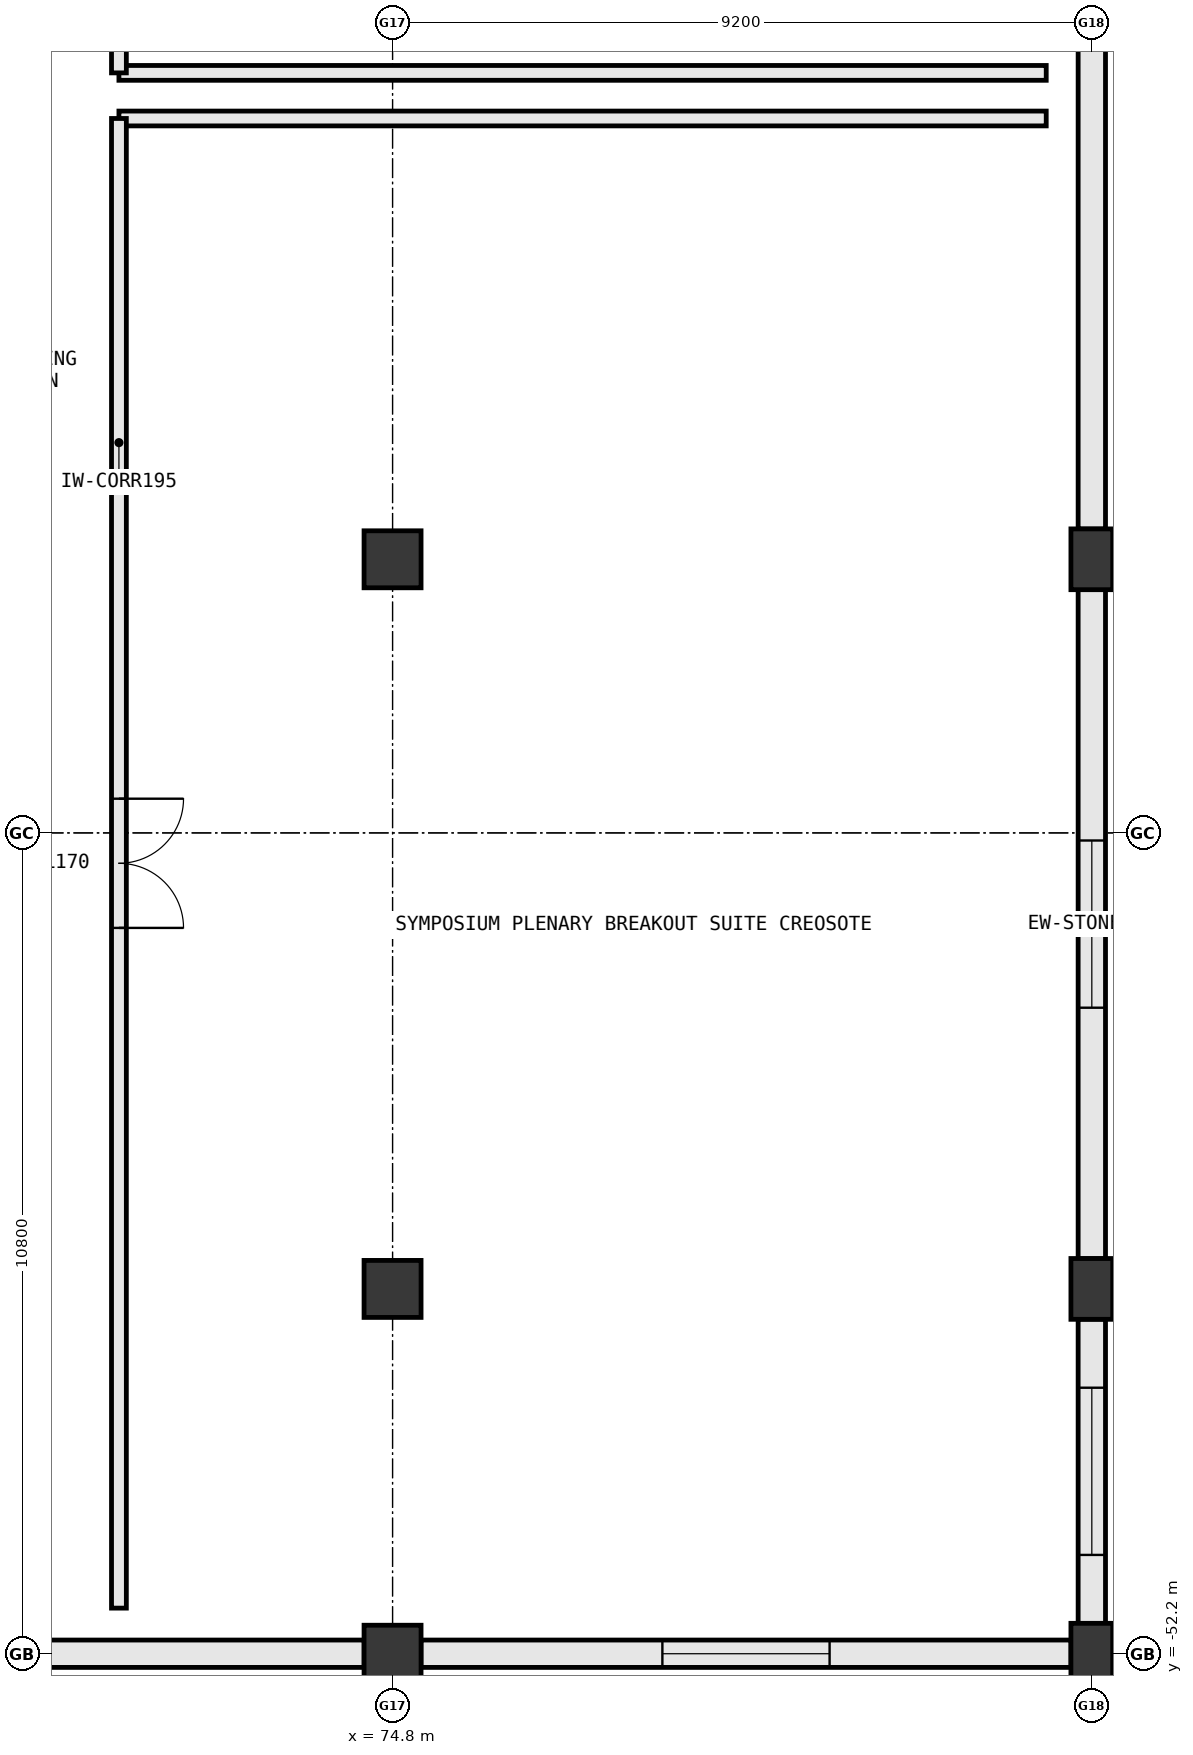
"""IFC4 building model, lengths in metres.
Left out: names, types, materials, properties, quantities, classifications, styles, units other than length and angle.
Written with IfcOpenShell. Run it as: python <this file> out.ifc"""

import sys

from ifc_helpers import new_model, si_unit, direction, frame, frame_2d, origin, origin_2d, place, context, subcontext, project, spatial, rectangle, extrude, element, fill, save


model = new_model("IFC4")
c1 = context("Model", 3, precision=1e-05, world=origin(), true_north=direction((0.0, 1.0)))
c2 = subcontext(c1, "Body", "Model", "MODEL_VIEW")
j1 = project(units=[si_unit("LENGTHUNIT", "METRE"), si_unit("PLANEANGLEUNIT", "RADIAN")], contexts=[c1])
p1 = place(None, origin())
s1 = spatial("IfcSite", under=j1, at=p1, CompositionType="ELEMENT")
p2 = place(p1, origin())
s2 = spatial("IfcBuilding", under=s1, at=p2, CompositionType="ELEMENT")
p3 = place(p2, frame((0.0, 0.0, 5.4)))
s3 = spatial("IfcBuildingStorey", under=s2, at=p3, CompositionType="ELEMENT", Elevation=5.4)
for number, where, z_axis, x_axis in (
    (1, (74.8, -52.2, 0.0), (0.0, 0.0, 1.0), (1.0, 0.0, 0.0)),
    (2, (74.8, -47.4, 0.0), (0.0, 0.0, 1.0), (1.0, 0.0, 0.0)),
    (3, (74.8, -37.8, 0.0), (0.0, 0.0, 1.0), (1.0, 0.0, 0.0)),
):
    element("IfcColumn", number, at=place(p3, frame(where, z_axis=z_axis, x_axis=x_axis)), inside=s3, PredefinedType="COLUMN", context=c2, shape_type="SweptSolid", body=[
        extrude(rectangle(XDim=0.75, YDim=0.75, at=origin_2d()), origin(), (0.0, 0.0, 1.0), 5.4),
    ])
for number, where, z_axis, x_axis in (
    (4, (84.0, -52.2, 0.0), (0.0, 0.0, 1.0), (1.0, 0.0, 0.0)),
    (5, (84.0, -47.4, 0.0), (0.0, 0.0, 1.0), (1.0, 0.0, 0.0)),
    (6, (84.0, -37.8, 0.0), (0.0, 0.0, 1.0), (1.0, 0.0, 0.0)),
):
    element("IfcColumn", number, at=place(p3, frame(where, z_axis=z_axis, x_axis=x_axis)), inside=s3, PredefinedType="PILASTER", context=c2, shape_type="SweptSolid", body=[
        extrude(rectangle(XDim=0.55, YDim=0.8, at=origin_2d()), origin(), (0.0, 0.0, 1.0), 5.4),
    ])
p4 = place(p3, frame((67.811, -52.2, 0.0), z_axis=(0.0, 0.0, 1.0), x_axis=(1.0, 0.0, 0.0)))
e7 = element("IfcWall", 7, at=p4, inside=s3, PredefinedType="STANDARD", context=c2, shape_type="SweptSolid", body=[
    extrude(rectangle(XDim=6.616, YDim=0.36, at=frame_2d((3.308, 0.0))), origin(), (0.0, 0.0, 1.0), 4.513),
])
p5 = place(p3, frame((75.173, -52.2, 0.0), z_axis=(0.0, 0.0, 1.0), x_axis=(1.0, 0.0, 0.0)))
e8 = element("IfcWall", 8, at=p5, inside=s3, PredefinedType="STANDARD", context=c2, shape_type="SweptSolid", body=[
    extrude(rectangle(XDim=8.554, YDim=0.36, at=frame_2d((4.277, 0.0))), origin(), (0.0, 0.0, 1.0), 4.513),
])
p6 = place(p5, frame((3.177, 0.0, 0.85)))
e9 = element("IfcOpeningElement", 9, at=p6, cuts=e8, PredefinedType="OPENING", context=c2, shape_type="SweptSolid", body=[
    extrude(rectangle(XDim=2.2, YDim=2.0, at=frame_2d((1.1, 1.0))), frame((0.0, 0.192, 0.0), z_axis=(0.0, -1.0, 0.0), x_axis=(1.0, 0.0, 0.0)), (0.0, 0.0, 1.0), 0.384),
])
p7 = place(p3, frame((84.0, -51.802, 0.0), z_axis=(0.0, 0.0, 1.0), x_axis=(0.0, 1.0, 0.0)))
e10 = element("IfcWall", 10, at=p7, inside=s3, PredefinedType="STANDARD", context=c2, shape_type="SweptSolid", body=[
    extrude(rectangle(XDim=4.004, YDim=0.36, at=frame_2d((2.002, 0.0))), origin(), (0.0, 0.0, 1.0), 4.662),
])
p8 = place(p7, frame((0.902, 0.0, 0.85)))
e11 = element("IfcOpeningElement", 11, at=p8, cuts=e10, PredefinedType="OPENING", context=c2, shape_type="SweptSolid", body=[
    extrude(rectangle(XDim=2.2, YDim=2.0, at=frame_2d((1.1, 1.0))), frame((0.0, 0.192, 0.0), z_axis=(0.0, -1.0, 0.0), x_axis=(1.0, 0.0, 0.0)), (0.0, 0.0, 1.0), 0.384),
])
p9 = place(p3, frame((84.0, -47.002, 0.0), z_axis=(0.0, 0.0, 1.0), x_axis=(0.0, 1.0, 0.0)))
e12 = element("IfcWall", 12, at=p9, inside=s3, PredefinedType="STANDARD", context=c2, shape_type="SweptSolid", body=[
    extrude(rectangle(XDim=8.804, YDim=0.36, at=frame_2d((4.402, 0.0))), origin(), (0.0, 0.0, 1.0), 4.662),
])
p10 = place(p9, frame((3.302, 0.0, 0.85)))
e13 = element("IfcOpeningElement", 13, at=p10, cuts=e12, PredefinedType="OPENING", context=c2, shape_type="SweptSolid", body=[
    extrude(rectangle(XDim=2.2, YDim=2.0, at=frame_2d((1.1, 1.0))), frame((0.0, 0.192, 0.0), z_axis=(0.0, -1.0, 0.0), x_axis=(1.0, 0.0, 0.0)), (0.0, 0.0, 1.0), 0.384),
])
p11 = place(p3, frame((84.0, -37.402, 0.0), z_axis=(0.0, 0.0, 1.0), x_axis=(0.0, 1.0, 0.0)))
e14 = element("IfcWall", 14, at=p11, inside=s3, PredefinedType="STANDARD", context=c2, shape_type="SweptSolid", body=[
    extrude(rectangle(XDim=8.804, YDim=0.36, at=frame_2d((4.402, 0.0))), origin(), (0.0, 0.0, 1.0), 4.662),
])
p12 = place(p3, frame((83.4, -32.0, 0.0), z_axis=(0.0, 0.0, 1.0), x_axis=(-1.0, 0.0, 0.0)))
e15 = element("IfcWall", 15, at=p12, inside=s3, PredefinedType="PARTITIONING", context=c2, shape_type="SweptSolid", body=[
    extrude(rectangle(XDim=12.2, YDim=0.195, at=frame_2d((6.1, 0.0))), origin(), (0.0, 0.0, 1.0), 5.13),
])
p13 = place(p3, frame((71.2, -32.0, 0.0), z_axis=(0.0, 0.0, 1.0), x_axis=(0.0, -1.0, 0.0)))
e16 = element("IfcWall", 16, at=p13, inside=s3, PredefinedType="PARTITIONING", context=c2, shape_type="SweptSolid", body=[
    extrude(rectangle(XDim=19.6, YDim=0.195, at=frame_2d((9.8, 0.0))), origin(), (0.0, 0.0, 1.0), 5.13),
])
p14 = place(p13, frame((8.95, 0.0, 0.0)))
e17 = element("IfcOpeningElement", 17, at=p14, cuts=e16, PredefinedType="OPENING", context=c2, shape_type="SweptSolid", body=[
    extrude(rectangle(XDim=1.7, YDim=2.3, at=frame_2d((0.85, 1.15))), frame((0.0, 0.11, 0.0), z_axis=(0.0, -1.0, 0.0), x_axis=(1.0, 0.0, 0.0)), (0.0, 0.0, 1.0), 0.219),
])
p15 = place(p3, frame((71.2, -31.4, 0.0), z_axis=(0.0, 0.0, 1.0), x_axis=(1.0, 0.0, 0.0)))
e18 = element("IfcWall", 18, at=p15, inside=s3, PredefinedType="PARTITIONING", context=c2, shape_type="SweptSolid", body=[
    extrude(rectangle(XDim=12.2, YDim=0.195, at=frame_2d((6.1, 0.0))), origin(), (0.0, 0.0, 1.0), 5.13),
])
p16 = place(p3, frame((71.2, -12.2, 0.0), z_axis=(0.0, 0.0, 1.0), x_axis=(0.0, -1.0, 0.0)))
e19 = element("IfcWall", 19, at=p16, inside=s3, PredefinedType="PARTITIONING", context=c2, shape_type="SweptSolid", body=[
    extrude(rectangle(XDim=19.2, YDim=0.195, at=frame_2d((9.6, 0.0))), origin(), (0.0, 0.0, 1.0), 5.13),
])
p17 = place(p16, frame((8.75, 0.0, 0.0)))
e20 = element("IfcOpeningElement", 20, at=p17, cuts=e19, PredefinedType="OPENING", context=c2, shape_type="SweptSolid", body=[
    extrude(rectangle(XDim=1.7, YDim=2.3, at=frame_2d((0.85, 1.15))), frame((0.0, 0.11, 0.0), z_axis=(0.0, -1.0, 0.0), x_axis=(1.0, 0.0, 0.0)), (0.0, 0.0, 1.0), 0.219),
])
p18 = place(p6, origin())
e21 = element("IfcWindow", 21, at=p18, inside=s3, PartitioningType="DOUBLE_PANEL_VERTICAL", PredefinedType="WINDOW", context=c2, shape_type="SweptSolid", body=[
    extrude(rectangle(XDim=2.2, YDim=2.0, at=frame_2d((1.1, 1.0))), frame((0.0, 0.03, 0.0), z_axis=(0.0, -1.0, 0.0), x_axis=(1.0, 0.0, 0.0)), (0.0, 0.0, 1.0), 0.06),
])
fill(e9, e21)
p19 = place(p8, origin())
e22 = element("IfcWindow", 22, at=p19, inside=s3, PartitioningType="DOUBLE_PANEL_VERTICAL", PredefinedType="WINDOW", context=c2, shape_type="SweptSolid", body=[
    extrude(rectangle(XDim=2.2, YDim=2.0, at=frame_2d((1.1, 1.0))), frame((0.0, 0.03, 0.0), z_axis=(0.0, -1.0, 0.0), x_axis=(1.0, 0.0, 0.0)), (0.0, 0.0, 1.0), 0.06),
])
fill(e11, e22)
p20 = place(p10, origin())
e23 = element("IfcWindow", 23, at=p20, inside=s3, PartitioningType="DOUBLE_PANEL_VERTICAL", PredefinedType="WINDOW", context=c2, shape_type="SweptSolid", body=[
    extrude(rectangle(XDim=2.2, YDim=2.0, at=frame_2d((1.1, 1.0))), frame((0.0, 0.03, 0.0), z_axis=(0.0, -1.0, 0.0), x_axis=(1.0, 0.0, 0.0)), (0.0, 0.0, 1.0), 0.06),
])
fill(e13, e23)
p21 = place(p14, origin())
e24 = element("IfcDoor", 24, at=p21, inside=s3, OperationType="DOUBLE_DOOR_SINGLE_SWING", PredefinedType="DOOR", context=c2, shape_type="SweptSolid", body=[
    extrude(rectangle(XDim=1.7, YDim=2.3, at=frame_2d((0.85, 1.15))), frame((0.0, 0.025, 0.0), z_axis=(0.0, -1.0, 0.0), x_axis=(1.0, 0.0, 0.0)), (0.0, 0.0, 1.0), 0.05),
])
fill(e17, e24)
save(model, sys.argv[1])
